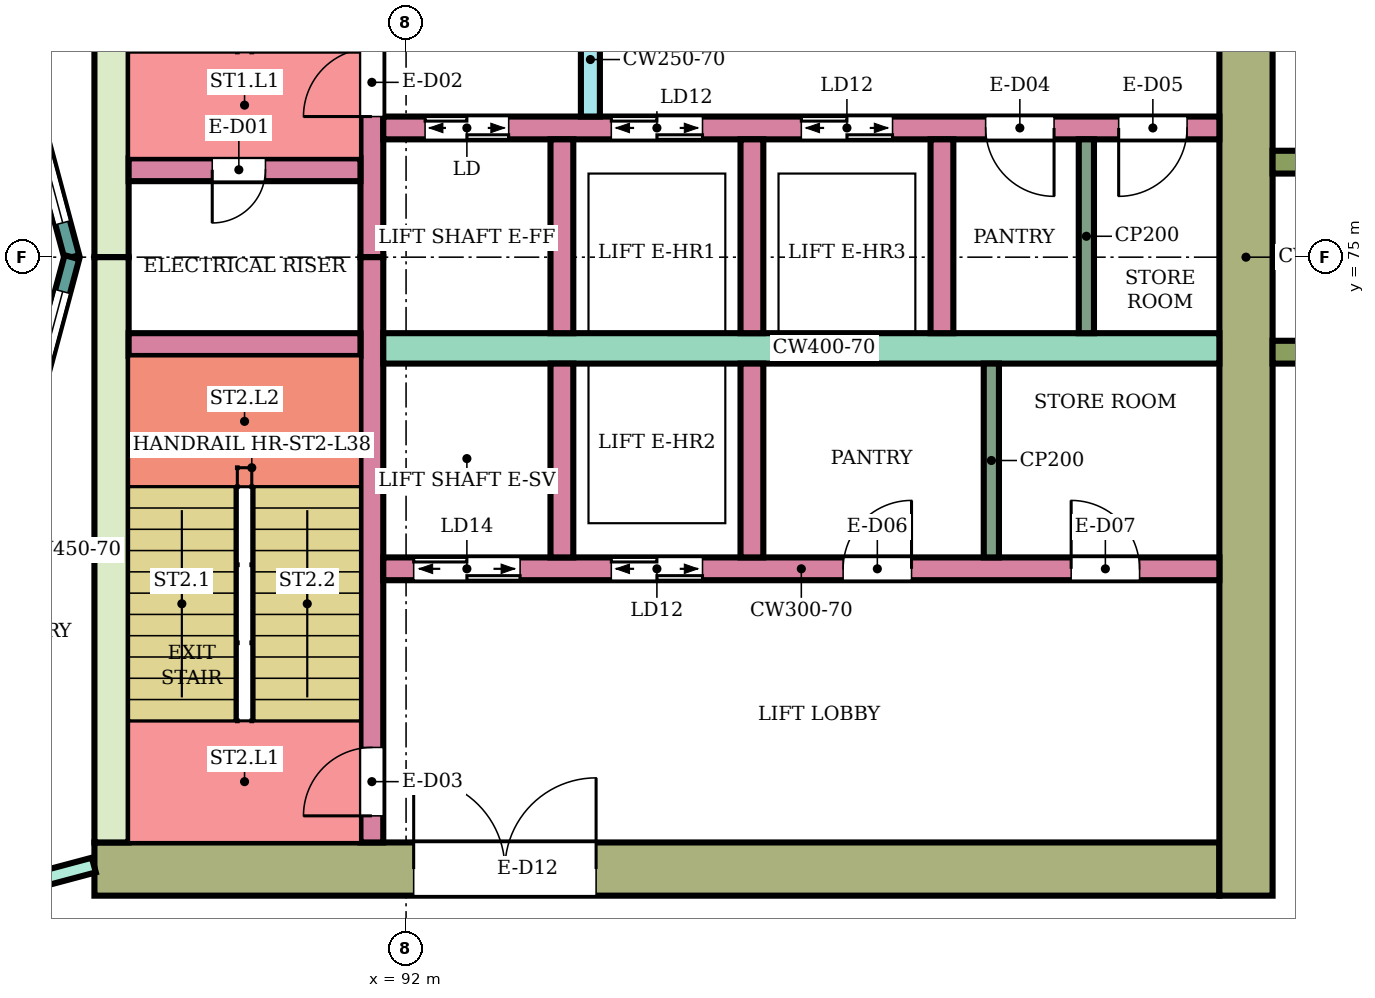
"""IFC4 building model, lengths in metres.
Left out: names, types, materials, properties, quantities, classifications, styles, units other than length and angle.
Written with IfcOpenShell. Run it as: python <this file> out.ifc"""

import sys

from ifc_helpers import new_model, si_unit, direction, frame, frame_2d, origin, place, context, subcontext, project, spatial, rectangle, extrude, element, fill, save


model = new_model("IFC4")
c1 = context("Model", 3, precision=1e-05, world=origin(), true_north=direction((0.0, 1.0)))
c2 = subcontext(c1, "Body", "Model", "MODEL_VIEW")
j1 = project(units=[si_unit("LENGTHUNIT", "METRE"), si_unit("PLANEANGLEUNIT", "RADIAN")], contexts=[c1])
p1 = place(None, origin())
s1 = spatial("IfcSite", under=j1, at=p1, CompositionType="ELEMENT")
p2 = place(p1, origin())
s2 = spatial("IfcBuilding", under=s1, at=p2, CompositionType="ELEMENT")
p3 = place(p2, frame((0.0, 0.0, 165.9)))
s3 = spatial("IfcBuildingStorey", under=s2, at=p3, CompositionType="ELEMENT", Elevation=165.9)
p4 = place(p3, frame((87.9, 66.95, 0.0), z_axis=(0.0, 0.0, 1.0), x_axis=(1.0, 0.0, 0.0)))
e1 = element("IfcWall", 1, at=p4, inside=s3, PredefinedType="SHEAR", context=c2, shape_type="SweptSolid", body=[
    extrude(rectangle(XDim=14.8, YDim=0.7, at=frame_2d((7.4, 0.0))), origin(), (0.0, 0.0, 1.0), 3.78),
])
p5 = place(p4, frame((4.2, 0.0, 0.0)))
e2 = element("IfcOpeningElement", 2, at=p5, cuts=e1, PredefinedType="OPENING", context=c2, shape_type="SweptSolid", body=[
    extrude(rectangle(XDim=2.4, YDim=2.4, at=frame_2d((1.2, 1.2))), frame((0.0, 0.36, 0.0), z_axis=(0.0, -1.0, 0.0), x_axis=(1.0, 0.0, 0.0)), (0.0, 0.0, 1.0), 0.72),
])
for number, where, z_axis, x_axis in (
    (3, (88.125, 75.0, 0.0), (0.0, 0.0, 1.0), (0.0, 1.0, 0.0)),
    (4, (88.125, 67.3, 0.0), (0.0, 0.0, 1.0), (0.0, 1.0, 0.0)),
):
    element("IfcWall", number, at=place(p3, frame(where, z_axis=z_axis, x_axis=x_axis)), inside=s3, PredefinedType="SHEAR", context=c2, shape_type="SweptSolid", body=[
        extrude(rectangle(XDim=7.7, YDim=0.45, at=frame_2d((3.85, 0.0))), origin(), (0.0, 0.0, 1.0), 3.78),
    ])
p6 = place(p3, frame((103.05, 66.6, 0.0), z_axis=(0.0, 0.0, 1.0), x_axis=(0.0, 1.0, 0.0)))
e5 = element("IfcWall", 5, at=p6, inside=s3, PredefinedType="SHEAR", context=c2, shape_type="SweptSolid", body=[
    extrude(rectangle(XDim=16.8, YDim=0.7, at=frame_2d((8.4, 0.0))), origin(), (0.0, 0.0, 1.0), 3.78),
])
p7 = place(p3, frame((91.55, 75.0, 0.0), z_axis=(0.0, 0.0, 1.0), x_axis=(0.0, 1.0, 0.0)))
e6 = element("IfcWall", 6, at=p7, inside=s3, PredefinedType="SHEAR", context=c2, shape_type="SweptSolid", body=[
    extrude(rectangle(XDim=7.7, YDim=0.3, at=frame_2d((3.85, 0.0))), origin(), (0.0, 0.0, 1.0), 3.78),
])
p8 = place(p7, frame((1.85, 0.0, 0.0)))
e7 = element("IfcOpeningElement", 7, at=p8, cuts=e6, PredefinedType="OPENING", context=c2, shape_type="SweptSolid", body=[
    extrude(rectangle(XDim=0.9, YDim=2.1, at=frame_2d((0.45, 1.05))), frame((0.0, 0.16, 0.0), z_axis=(0.0, -1.0, 0.0), x_axis=(1.0, 0.0, 0.0)), (0.0, 0.0, 1.0), 0.32),
])
p9 = place(p3, frame((91.55, 67.3, 0.0), z_axis=(0.0, 0.0, 1.0), x_axis=(0.0, 1.0, 0.0)))
e8 = element("IfcWall", 8, at=p9, inside=s3, PredefinedType="SHEAR", context=c2, shape_type="SweptSolid", body=[
    extrude(rectangle(XDim=7.7, YDim=0.3, at=frame_2d((3.85, 0.0))), origin(), (0.0, 0.0, 1.0), 3.78),
])
p10 = place(p9, frame((0.35, 0.0, 0.0)))
e9 = element("IfcOpeningElement", 9, at=p10, cuts=e8, PredefinedType="OPENING", context=c2, shape_type="SweptSolid", body=[
    extrude(rectangle(XDim=0.9, YDim=2.1, at=frame_2d((0.45, 1.05))), frame((0.0, 0.16, 0.0), z_axis=(0.0, -1.0, 0.0), x_axis=(1.0, 0.0, 0.0)), (0.0, 0.0, 1.0), 0.32),
])
p11 = place(p3, frame((88.35, 76.15, 0.0), z_axis=(0.0, 0.0, 1.0), x_axis=(1.0, 0.0, 0.0)))
e10 = element("IfcWall", 10, at=p11, inside=s3, PredefinedType="SHEAR", context=c2, shape_type="SweptSolid", body=[
    extrude(rectangle(XDim=3.05, YDim=0.3, at=frame_2d((1.525, 0.0))), origin(), (0.0, 0.0, 1.0), 3.78),
])
p12 = place(p11, frame((1.1, 0.0, 0.0)))
e11 = element("IfcOpeningElement", 11, at=p12, cuts=e10, PredefinedType="OPENING", context=c2, shape_type="SweptSolid", body=[
    extrude(rectangle(XDim=0.7, YDim=2.0, at=frame_2d((0.35, 1.0))), frame((0.0, 0.16, 0.0), z_axis=(0.0, -1.0, 0.0), x_axis=(1.0, 0.0, 0.0)), (0.0, 0.0, 1.0), 0.32),
])
p13 = place(p3, frame((88.35, 73.85, 0.0), z_axis=(0.0, 0.0, 1.0), x_axis=(1.0, 0.0, 0.0)))
e12 = element("IfcWall", 12, at=p13, inside=s3, PredefinedType="SHEAR", context=c2, shape_type="SweptSolid", body=[
    extrude(rectangle(XDim=3.05, YDim=0.3, at=frame_2d((1.525, 0.0))), origin(), (0.0, 0.0, 1.0), 3.78),
])
p14 = place(p3, frame((91.7, 76.7, 0.0), z_axis=(0.0, 0.0, 1.0), x_axis=(1.0, 0.0, 0.0)))
e13 = element("IfcWall", 13, at=p14, inside=s3, PredefinedType="SHEAR", context=c2, shape_type="SweptSolid", body=[
    extrude(rectangle(XDim=11.0, YDim=0.3, at=frame_2d((5.5, 0.0))), origin(), (0.0, 0.0, 1.0), 3.78),
])
p15 = place(p14, frame((0.55, 0.0, 0.0)))
e14 = element("IfcOpeningElement", 14, at=p15, cuts=e13, PredefinedType="OPENING", context=c2, shape_type="SweptSolid", body=[
    extrude(rectangle(XDim=1.1, YDim=2.1, at=frame_2d((0.55, 1.05))), frame((0.0, 0.16, 0.0), z_axis=(0.0, -1.0, 0.0), x_axis=(1.0, 0.0, 0.0)), (0.0, 0.0, 1.0), 0.32),
])
p16 = place(p14, frame((3.0, 0.0, 0.0)))
e15 = element("IfcOpeningElement", 15, at=p16, cuts=e13, PredefinedType="OPENING", context=c2, shape_type="SweptSolid", body=[
    extrude(rectangle(XDim=1.2, YDim=2.1, at=frame_2d((0.6, 1.05))), frame((0.0, 0.16, 0.0), z_axis=(0.0, -1.0, 0.0), x_axis=(1.0, 0.0, 0.0)), (0.0, 0.0, 1.0), 0.32),
])
p17 = place(p14, frame((5.5, 0.0, 0.0)))
e16 = element("IfcOpeningElement", 16, at=p17, cuts=e13, PredefinedType="OPENING", context=c2, shape_type="SweptSolid", body=[
    extrude(rectangle(XDim=1.2, YDim=2.1, at=frame_2d((0.6, 1.05))), frame((0.0, 0.16, 0.0), z_axis=(0.0, -1.0, 0.0), x_axis=(1.0, 0.0, 0.0)), (0.0, 0.0, 1.0), 0.32),
])
p18 = place(p14, frame((7.925, 0.0, 0.0)))
e17 = element("IfcOpeningElement", 17, at=p18, cuts=e13, PredefinedType="OPENING", context=c2, shape_type="SweptSolid", body=[
    extrude(rectangle(XDim=0.9, YDim=2.1, at=frame_2d((0.45, 1.05))), frame((0.0, 0.16, 0.0), z_axis=(0.0, -1.0, 0.0), x_axis=(1.0, 0.0, 0.0)), (0.0, 0.0, 1.0), 0.32),
])
p19 = place(p14, frame((9.675, 0.0, 0.0)))
e18 = element("IfcOpeningElement", 18, at=p19, cuts=e13, PredefinedType="OPENING", context=c2, shape_type="SweptSolid", body=[
    extrude(rectangle(XDim=0.9, YDim=2.1, at=frame_2d((0.45, 1.05))), frame((0.0, 0.16, 0.0), z_axis=(0.0, -1.0, 0.0), x_axis=(1.0, 0.0, 0.0)), (0.0, 0.0, 1.0), 0.32),
])
p20 = place(p3, frame((91.7, 73.8, 0.0), z_axis=(0.0, 0.0, 1.0), x_axis=(1.0, 0.0, 0.0)))
e19 = element("IfcWall", 19, at=p20, inside=s3, PredefinedType="SHEAR", context=c2, shape_type="SweptSolid", body=[
    extrude(rectangle(XDim=11.0, YDim=0.4, at=frame_2d((5.5, 0.0))), origin(), (0.0, 0.0, 1.0), 3.78),
])
p21 = place(p3, frame((91.7, 70.9, 0.0), z_axis=(0.0, 0.0, 1.0), x_axis=(1.0, 0.0, 0.0)))
e20 = element("IfcWall", 20, at=p21, inside=s3, PredefinedType="SHEAR", context=c2, shape_type="SweptSolid", body=[
    extrude(rectangle(XDim=11.0, YDim=0.3, at=frame_2d((5.5, 0.0))), origin(), (0.0, 0.0, 1.0), 3.78),
])
p22 = place(p21, frame((0.4, 0.0, 0.0)))
e21 = element("IfcOpeningElement", 21, at=p22, cuts=e20, PredefinedType="OPENING", context=c2, shape_type="SweptSolid", body=[
    extrude(rectangle(XDim=1.4, YDim=2.1, at=frame_2d((0.7, 1.05))), frame((0.0, 0.16, 0.0), z_axis=(0.0, -1.0, 0.0), x_axis=(1.0, 0.0, 0.0)), (0.0, 0.0, 1.0), 0.32),
])
p23 = place(p21, frame((3.0, 0.0, 0.0)))
e22 = element("IfcOpeningElement", 22, at=p23, cuts=e20, PredefinedType="OPENING", context=c2, shape_type="SweptSolid", body=[
    extrude(rectangle(XDim=1.2, YDim=2.1, at=frame_2d((0.6, 1.05))), frame((0.0, 0.16, 0.0), z_axis=(0.0, -1.0, 0.0), x_axis=(1.0, 0.0, 0.0)), (0.0, 0.0, 1.0), 0.32),
])
p24 = place(p21, frame((6.05, 0.0, 0.0)))
e23 = element("IfcOpeningElement", 23, at=p24, cuts=e20, PredefinedType="OPENING", context=c2, shape_type="SweptSolid", body=[
    extrude(rectangle(XDim=0.9, YDim=2.1, at=frame_2d((0.45, 1.05))), frame((0.0, 0.16, 0.0), z_axis=(0.0, -1.0, 0.0), x_axis=(1.0, 0.0, 0.0)), (0.0, 0.0, 1.0), 0.32),
])
p25 = place(p21, frame((9.05, 0.0, 0.0)))
e24 = element("IfcOpeningElement", 24, at=p25, cuts=e20, PredefinedType="OPENING", context=c2, shape_type="SweptSolid", body=[
    extrude(rectangle(XDim=0.9, YDim=2.1, at=frame_2d((0.45, 1.05))), frame((0.0, 0.16, 0.0), z_axis=(0.0, -1.0, 0.0), x_axis=(1.0, 0.0, 0.0)), (0.0, 0.0, 1.0), 0.32),
])
for number, where, z_axis, x_axis in (
    (25, (94.05, 74.0, 0.0), (0.0, 0.0, 1.0), (0.0, 1.0, 0.0)),
    (26, (96.55, 74.0, 0.0), (0.0, 0.0, 1.0), (0.0, 1.0, 0.0)),
    (27, (99.05, 74.0, 0.0), (0.0, 0.0, 1.0), (0.0, 1.0, 0.0)),
    (28, (94.05, 71.05, 0.0), (0.0, 0.0, 1.0), (0.0, 1.0, 0.0)),
    (29, (96.55, 71.05, 0.0), (0.0, 0.0, 1.0), (0.0, 1.0, 0.0)),
):
    element("IfcWall", number, at=place(p3, frame(where, z_axis=z_axis, x_axis=x_axis)), inside=s3, PredefinedType="SHEAR", context=c2, shape_type="SweptSolid", body=[
        extrude(rectangle(XDim=2.55, YDim=0.3, at=frame_2d((1.275, 0.0))), origin(), (0.0, 0.0, 1.0), 3.78),
    ])
p26 = place(p3, frame((94.425, 76.85, 0.0), z_axis=(0.0, 0.0, 1.0), x_axis=(0.0, 1.0, 0.0)))
e30 = element("IfcWall", 30, at=p26, inside=s3, PredefinedType="SHEAR", context=c2, shape_type="SweptSolid", body=[
    extrude(rectangle(XDim=1.5, YDim=0.25, at=frame_2d((0.75, 0.0))), origin(), (0.0, 0.0, 1.0), 3.78),
])
for number, where, z_axis, x_axis in (
    (31, (103.4, 73.75, 0.0), (0.0, 0.0, 1.0), (1.0, 0.0, 0.0)),
    (32, (103.4, 76.25, 0.0), (0.0, 0.0, 1.0), (1.0, 0.0, 0.0)),
):
    element("IfcWall", number, at=place(p3, frame(where, z_axis=z_axis, x_axis=x_axis)), inside=s3, PredefinedType="NOTDEFINED", context=c2, shape_type="SweptSolid", body=[
        extrude(rectangle(XDim=2.416, YDim=0.3, at=frame_2d((1.208, 0.0))), origin(), (0.0, 0.0, 1.0), 4.1),
    ])
p27 = place(p3, frame((87.604, 75.0, 0.0), z_axis=(0.0, 0.0, 1.0), x_axis=(-0.258789828301, 0.965933654434, 0.0)))
e33 = element("IfcWall", 33, at=p27, inside=s3, PredefinedType="NOTDEFINED", context=c2, shape_type="SweptSolid", body=[
    extrude(rectangle(XDim=3.936, YDim=0.2, at=frame_2d((1.968, 0.0))), origin(), (0.0, 0.0, 1.0), 4.1),
])
p28 = place(p27, frame((0.468, 0.0, 0.9)))
e34 = element("IfcOpeningElement", 34, at=p28, cuts=e33, PredefinedType="OPENING", context=c2, shape_type="SweptSolid", body=[
    extrude(rectangle(XDim=3.0, YDim=2.3, at=frame_2d((1.5, 1.15))), frame((0.0, 0.11, 0.0), z_axis=(0.0, -1.0, 0.0), x_axis=(1.0, 0.0, 0.0)), (0.0, 0.0, 1.0), 0.22),
])
p29 = place(p3, frame((86.585, 71.198, 0.0), z_axis=(0.0, 0.0, 1.0), x_axis=(0.258789828301, 0.965933654434, 0.0)))
e35 = element("IfcWall", 35, at=p29, inside=s3, PredefinedType="NOTDEFINED", context=c2, shape_type="SweptSolid", body=[
    extrude(rectangle(XDim=3.936, YDim=0.2, at=frame_2d((1.968, 0.0))), origin(), (0.0, 0.0, 1.0), 4.1),
])
p30 = place(p29, frame((0.468, 0.0, 0.9)))
e36 = element("IfcOpeningElement", 36, at=p30, cuts=e35, PredefinedType="OPENING", context=c2, shape_type="SweptSolid", body=[
    extrude(rectangle(XDim=3.0, YDim=2.3, at=frame_2d((1.5, 1.15))), frame((0.0, 0.11, 0.0), z_axis=(0.0, -1.0, 0.0), x_axis=(1.0, 0.0, 0.0)), (0.0, 0.0, 1.0), 0.22),
])
p31 = place(p3, frame((80.125, 64.932, 0.0), z_axis=(0.0, 0.0, 1.0), x_axis=(0.966236955806, 0.257655089674, 0.0)))
e37 = element("IfcWall", 37, at=p31, inside=s3, PredefinedType="PARTITIONING", context=c2, shape_type="SweptSolid", body=[
    extrude(rectangle(XDim=8.039, YDim=0.2, at=frame_2d((4.02, 0.0))), origin(), (0.0, 0.0, 1.0), 3.65),
])
p32 = place(p31, frame((6.298, 0.0, 0.0)))
e38 = element("IfcOpeningElement", 38, at=p32, cuts=e37, PredefinedType="OPENING", context=c2, shape_type="SweptSolid", body=[
    extrude(rectangle(XDim=0.9, YDim=2.1, at=frame_2d((0.45, 1.05))), frame((0.0, 0.11, 0.0), z_axis=(0.0, -1.0, 0.0), x_axis=(1.0, 0.0, 0.0)), (0.0, 0.0, 1.0), 0.22),
])
p33 = place(p31, frame((2.045, 0.0, 0.0)))
e39 = element("IfcOpeningElement", 39, at=p33, cuts=e37, PredefinedType="OPENING", context=c2, shape_type="SweptSolid", body=[
    extrude(rectangle(XDim=0.9, YDim=2.1, at=frame_2d((0.45, 1.05))), frame((0.0, 0.11, 0.0), z_axis=(0.0, -1.0, 0.0), x_axis=(1.0, 0.0, 0.0)), (0.0, 0.0, 1.0), 0.22),
])
for number, where, z_axis, x_axis in (
    (40, (100.95, 74.0, 0.0), (0.0, 0.0, 1.0), (0.0, 1.0, 0.0)),
    (41, (99.7, 71.05, 0.0), (0.0, 0.0, 1.0), (0.0, 1.0, 0.0)),
):
    element("IfcWall", number, at=place(p3, frame(where, z_axis=z_axis, x_axis=x_axis)), inside=s3, PredefinedType="PARTITIONING", context=c2, shape_type="SweptSolid", body=[
        extrude(rectangle(XDim=2.55, YDim=0.2, at=frame_2d((1.275, 0.0))), origin(), (0.0, 0.0, 1.0), 3.78),
    ])
p34 = place(p28, origin())
e42 = element("IfcWindow", 42, at=p34, inside=s3, PartitioningType="SINGLE_PANEL", PredefinedType="WINDOW", context=c2, shape_type="SweptSolid", body=[
    extrude(rectangle(XDim=3.0, YDim=2.3, at=frame_2d((1.5, 1.15))), frame((0.0, 0.03, 0.0), z_axis=(0.0, -1.0, 0.0), x_axis=(1.0, 0.0, 0.0)), (0.0, 0.0, 1.0), 0.06),
])
fill(e34, e42)
p35 = place(p30, origin())
e43 = element("IfcWindow", 43, at=p35, inside=s3, PartitioningType="SINGLE_PANEL", PredefinedType="WINDOW", context=c2, shape_type="SweptSolid", body=[
    extrude(rectangle(XDim=3.0, YDim=2.3, at=frame_2d((1.5, 1.15))), frame((0.0, 0.03, 0.0), z_axis=(0.0, -1.0, 0.0), x_axis=(1.0, 0.0, 0.0)), (0.0, 0.0, 1.0), 0.06),
])
fill(e36, e43)
p36 = place(p12, frame((0.7, 0.0, 0.0), z_axis=(0.0, 0.0, 1.0), x_axis=(-1.0, 0.0, 0.0)))
e44 = element("IfcDoor", 44, at=p36, inside=s3, OperationType="SINGLE_SWING_RIGHT", PredefinedType="DOOR", context=c2, shape_type="SweptSolid", body=[
    extrude(rectangle(XDim=0.7, YDim=2.0, at=frame_2d((0.35, 1.0))), frame((0.0, 0.025, 0.0), z_axis=(0.0, -1.0, 0.0), x_axis=(1.0, 0.0, 0.0)), (0.0, 0.0, 1.0), 0.05),
])
fill(e11, e44)
p37 = place(p8, origin())
e45 = element("IfcDoor", 45, at=p37, inside=s3, OperationType="SINGLE_SWING_LEFT", PredefinedType="DOOR", context=c2, shape_type="SweptSolid", body=[
    extrude(rectangle(XDim=0.9, YDim=2.1, at=frame_2d((0.45, 1.05))), frame((0.0, 0.025, 0.0), z_axis=(0.0, -1.0, 0.0), x_axis=(1.0, 0.0, 0.0)), (0.0, 0.0, 1.0), 0.05),
])
fill(e7, e45)
p38 = place(p10, origin())
e46 = element("IfcDoor", 46, at=p38, inside=s3, OperationType="SINGLE_SWING_LEFT", PredefinedType="DOOR", context=c2, shape_type="SweptSolid", body=[
    extrude(rectangle(XDim=0.9, YDim=2.1, at=frame_2d((0.45, 1.05))), frame((0.0, 0.025, 0.0), z_axis=(0.0, -1.0, 0.0), x_axis=(1.0, 0.0, 0.0)), (0.0, 0.0, 1.0), 0.05),
])
fill(e9, e46)
p39 = place(p15, origin())
e47 = element("IfcDoor", 47, at=p39, inside=s3, OperationType="DOUBLE_DOOR_SLIDING", PredefinedType="DOOR", context=c2, shape_type="SweptSolid", body=[
    extrude(rectangle(XDim=1.1, YDim=2.1, at=frame_2d((0.55, 1.05))), frame((0.0, 0.025, 0.0), z_axis=(0.0, -1.0, 0.0), x_axis=(1.0, 0.0, 0.0)), (0.0, 0.0, 1.0), 0.05),
])
fill(e14, e47)
p40 = place(p16, origin())
e48 = element("IfcDoor", 48, at=p40, inside=s3, OperationType="DOUBLE_DOOR_SLIDING", PredefinedType="DOOR", context=c2, shape_type="SweptSolid", body=[
    extrude(rectangle(XDim=1.2, YDim=2.1, at=frame_2d((0.6, 1.05))), frame((0.0, 0.025, 0.0), z_axis=(0.0, -1.0, 0.0), x_axis=(1.0, 0.0, 0.0)), (0.0, 0.0, 1.0), 0.05),
])
fill(e15, e48)
p41 = place(p17, origin())
e49 = element("IfcDoor", 49, at=p41, inside=s3, OperationType="DOUBLE_DOOR_SLIDING", PredefinedType="DOOR", context=c2, shape_type="SweptSolid", body=[
    extrude(rectangle(XDim=1.2, YDim=2.1, at=frame_2d((0.6, 1.05))), frame((0.0, 0.025, 0.0), z_axis=(0.0, -1.0, 0.0), x_axis=(1.0, 0.0, 0.0)), (0.0, 0.0, 1.0), 0.05),
])
fill(e16, e49)
p42 = place(p18, frame((0.9, 0.0, 0.0), z_axis=(0.0, 0.0, 1.0), x_axis=(-1.0, 0.0, 0.0)))
e50 = element("IfcDoor", 50, at=p42, inside=s3, OperationType="SINGLE_SWING_LEFT", PredefinedType="DOOR", context=c2, shape_type="SweptSolid", body=[
    extrude(rectangle(XDim=0.9, YDim=2.1, at=frame_2d((0.45, 1.05))), frame((0.0, 0.025, 0.0), z_axis=(0.0, -1.0, 0.0), x_axis=(1.0, 0.0, 0.0)), (0.0, 0.0, 1.0), 0.05),
])
fill(e17, e50)
p43 = place(p19, frame((0.9, 0.0, 0.0), z_axis=(0.0, 0.0, 1.0), x_axis=(-1.0, 0.0, 0.0)))
e51 = element("IfcDoor", 51, at=p43, inside=s3, OperationType="SINGLE_SWING_RIGHT", PredefinedType="DOOR", context=c2, shape_type="SweptSolid", body=[
    extrude(rectangle(XDim=0.9, YDim=2.1, at=frame_2d((0.45, 1.05))), frame((0.0, 0.025, 0.0), z_axis=(0.0, -1.0, 0.0), x_axis=(1.0, 0.0, 0.0)), (0.0, 0.0, 1.0), 0.05),
])
fill(e18, e51)
p44 = place(p22, origin())
e52 = element("IfcDoor", 52, at=p44, inside=s3, OperationType="DOUBLE_DOOR_SLIDING", PredefinedType="DOOR", context=c2, shape_type="SweptSolid", body=[
    extrude(rectangle(XDim=1.4, YDim=2.1, at=frame_2d((0.7, 1.05))), frame((0.0, 0.025, 0.0), z_axis=(0.0, -1.0, 0.0), x_axis=(1.0, 0.0, 0.0)), (0.0, 0.0, 1.0), 0.05),
])
fill(e21, e52)
p45 = place(p23, origin())
e53 = element("IfcDoor", 53, at=p45, inside=s3, OperationType="DOUBLE_DOOR_SLIDING", PredefinedType="DOOR", context=c2, shape_type="SweptSolid", body=[
    extrude(rectangle(XDim=1.2, YDim=2.1, at=frame_2d((0.6, 1.05))), frame((0.0, 0.025, 0.0), z_axis=(0.0, -1.0, 0.0), x_axis=(1.0, 0.0, 0.0)), (0.0, 0.0, 1.0), 0.05),
])
fill(e22, e53)
p46 = place(p24, origin())
e54 = element("IfcDoor", 54, at=p46, inside=s3, OperationType="SINGLE_SWING_RIGHT", PredefinedType="DOOR", context=c2, shape_type="SweptSolid", body=[
    extrude(rectangle(XDim=0.9, YDim=2.1, at=frame_2d((0.45, 1.05))), frame((0.0, 0.025, 0.0), z_axis=(0.0, -1.0, 0.0), x_axis=(1.0, 0.0, 0.0)), (0.0, 0.0, 1.0), 0.05),
])
fill(e23, e54)
p47 = place(p25, origin())
e55 = element("IfcDoor", 55, at=p47, inside=s3, OperationType="SINGLE_SWING_LEFT", PredefinedType="DOOR", context=c2, shape_type="SweptSolid", body=[
    extrude(rectangle(XDim=0.9, YDim=2.1, at=frame_2d((0.45, 1.05))), frame((0.0, 0.025, 0.0), z_axis=(0.0, -1.0, 0.0), x_axis=(1.0, 0.0, 0.0)), (0.0, 0.0, 1.0), 0.05),
])
fill(e24, e55)
p48 = place(p5, origin())
e56 = element("IfcDoor", 56, at=p48, inside=s3, OperationType="DOUBLE_DOOR_SINGLE_SWING", PredefinedType="DOOR", context=c2, shape_type="SweptSolid", body=[
    extrude(rectangle(XDim=2.4, YDim=2.4, at=frame_2d((1.2, 1.2))), frame((0.0, 0.025, 0.0), z_axis=(0.0, -1.0, 0.0), x_axis=(1.0, 0.0, 0.0)), (0.0, 0.0, 1.0), 0.05),
])
fill(e2, e56)
save(model, sys.argv[1])
